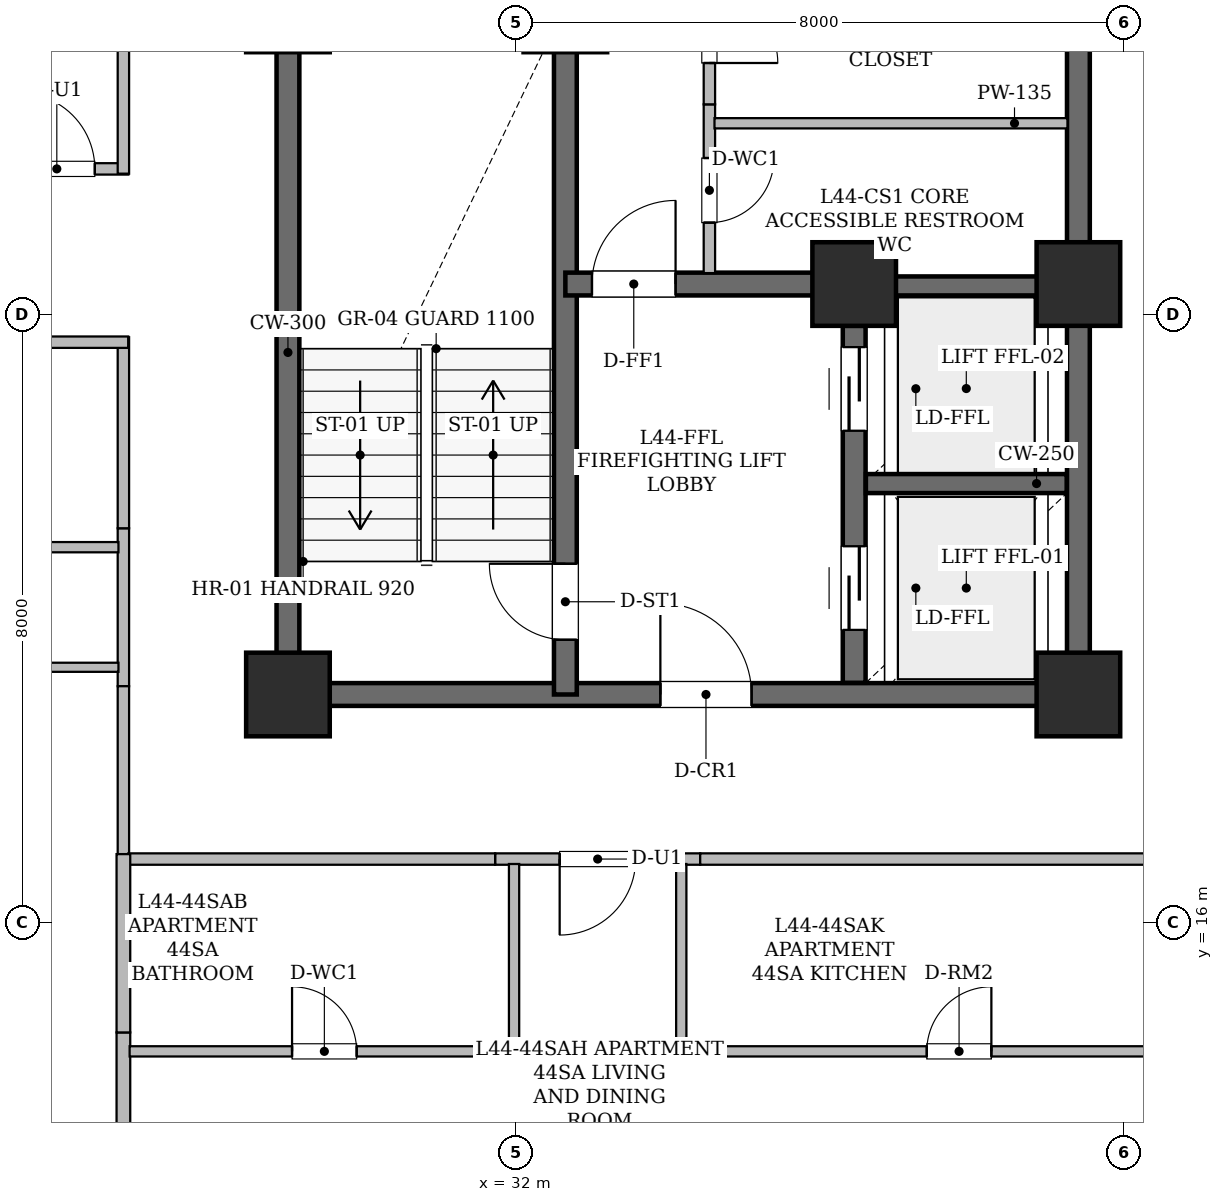
"""IFC4 building model, lengths in metres.
Left out: names, types, materials, properties, quantities, classifications, styles, units other than length and angle.
Written with IfcOpenShell. Run it as: python <this file> out.ifc"""

import sys

from ifc_helpers import new_model, si_unit, direction, frame, frame_2d, origin, origin_2d, place, context, subcontext, project, spatial, rectangle, hollow_rectangle, extrude, element, fill, save


model = new_model("IFC4")
c1 = context("Model", 3, precision=1e-05, world=origin(), true_north=direction((0.0, 1.0)))
c2 = subcontext(c1, "Body", "Model", "MODEL_VIEW")
j1 = project(units=[si_unit("LENGTHUNIT", "METRE"), si_unit("PLANEANGLEUNIT", "RADIAN")], contexts=[c1])
p1 = place(None, origin())
s1 = spatial("IfcSite", under=j1, at=p1, CompositionType="ELEMENT")
p2 = place(p1, origin())
s2 = spatial("IfcBuilding", under=s1, at=p2, CompositionType="ELEMENT")
p3 = place(p2, frame((0.0, 0.0, 174.15)))
s3 = spatial("IfcBuildingStorey", under=s2, at=p3, CompositionType="ELEMENT", Elevation=174.15)
for number, where, z_axis, x_axis in (
    (1, (29.0, 19.0, 0.0), (0.0, 0.0, 1.0), (1.0, 0.0, 0.0)),
    (2, (39.4, 19.0, 0.0), (0.0, 0.0, 1.0), (1.0, 0.0, 0.0)),
    (3, (36.45, 24.4, 0.0), (0.0, 0.0, 1.0), (1.0, 0.0, 0.0)),
    (4, (39.4, 24.4, 0.0), (0.0, 0.0, 1.0), (1.0, 0.0, 0.0)),
):
    element("IfcColumn", number, at=place(p3, frame(where, z_axis=z_axis, x_axis=x_axis)), inside=s3, PredefinedType="COLUMN", context=c2, shape_type="SweptSolid", body=[
        extrude(hollow_rectangle(XDim=1.1, YDim=1.1, WallThickness=0.055, at=origin_2d()), origin(), (0.0, 0.0, 1.0), 3.65),
    ])
p4 = place(p3, frame((29.0, 19.0, 0.0), z_axis=(0.0, 0.0, 1.0), x_axis=(0.0, 1.0, 0.0)))
e5 = element("IfcWall", 5, at=p4, inside=s3, PredefinedType="SHEAR", context=c2, shape_type="SweptSolid", body=[
    extrude(rectangle(XDim=9.0, YDim=0.3, at=frame_2d((4.5, 0.0))), origin(), (0.0, 0.0, 1.0), 3.43),
])
p5 = place(p3, frame((29.0, 19.0, 0.0), z_axis=(0.0, 0.0, 1.0), x_axis=(1.0, 0.0, 0.0)))
e6 = element("IfcWall", 6, at=p5, inside=s3, PredefinedType="SHEAR", context=c2, shape_type="SweptSolid", body=[
    extrude(rectangle(XDim=10.4, YDim=0.3, at=frame_2d((5.2, 0.0))), origin(), (0.0, 0.0, 1.0), 3.43),
])
p6 = place(p5, frame((4.9, 0.0, 0.0)))
e7 = element("IfcOpeningElement", 7, at=p6, cuts=e6, PredefinedType="OPENING", context=c2, shape_type="SweptSolid", body=[
    extrude(rectangle(XDim=1.2, YDim=2.15, at=frame_2d((0.6, 1.075))), frame((0.0, 0.16, 0.0), z_axis=(0.0, -1.0, 0.0), x_axis=(1.0, 0.0, 0.0)), (0.0, 0.0, 1.0), 0.32),
])
p7 = place(p3, frame((39.4, 19.0, 0.0), z_axis=(0.0, 0.0, 1.0), x_axis=(0.0, 1.0, 0.0)))
e8 = element("IfcWall", 8, at=p7, inside=s3, PredefinedType="SHEAR", context=c2, shape_type="SweptSolid", body=[
    extrude(rectangle(XDim=5.4, YDim=0.3, at=frame_2d((2.7, 0.0))), origin(), (0.0, 0.0, 1.0), 3.43),
])
p8 = place(p3, frame((39.4, 24.4, 0.0), z_axis=(0.0, 0.0, 1.0), x_axis=(0.0, 1.0, 0.0)))
e9 = element("IfcWall", 9, at=p8, inside=s3, PredefinedType="SHEAR", context=c2, shape_type="SweptSolid", body=[
    extrude(rectangle(XDim=12.6, YDim=0.3, at=frame_2d((6.3, 0.0))), origin(), (0.0, 0.0, 1.0), 3.43),
])
p9 = place(p3, frame((32.65, 19.0, 0.0), z_axis=(0.0, 0.0, 1.0), x_axis=(0.0, 1.0, 0.0)))
e10 = element("IfcWall", 10, at=p9, inside=s3, PredefinedType="SHEAR", context=c2, shape_type="SweptSolid", body=[
    extrude(rectangle(XDim=9.0, YDim=0.3, at=frame_2d((4.5, 0.0))), origin(), (0.0, 0.0, 1.0), 3.43),
])
p10 = place(p9, frame((0.72, 0.0, 0.0)))
e11 = element("IfcOpeningElement", 11, at=p10, cuts=e10, PredefinedType="OPENING", context=c2, shape_type="SweptSolid", body=[
    extrude(rectangle(XDim=1.0, YDim=2.15, at=frame_2d((0.5, 1.075))), frame((0.0, 0.16, 0.0), z_axis=(0.0, -1.0, 0.0), x_axis=(1.0, 0.0, 0.0)), (0.0, 0.0, 1.0), 0.32),
])
p11 = place(p3, frame((32.65, 24.4, 0.0), z_axis=(0.0, 0.0, 1.0), x_axis=(1.0, 0.0, 0.0)))
e12 = element("IfcWall", 12, at=p11, inside=s3, PredefinedType="SHEAR", context=c2, shape_type="SweptSolid", body=[
    extrude(rectangle(XDim=3.8, YDim=0.3, at=frame_2d((1.9, 0.0))), origin(), (0.0, 0.0, 1.0), 3.43),
])
p12 = place(p11, frame((0.35, 0.0, 0.0)))
e13 = element("IfcOpeningElement", 13, at=p12, cuts=e12, PredefinedType="OPENING", context=c2, shape_type="SweptSolid", body=[
    extrude(rectangle(XDim=1.1, YDim=2.15, at=frame_2d((0.55, 1.075))), frame((0.0, 0.16, 0.0), z_axis=(0.0, -1.0, 0.0), x_axis=(1.0, 0.0, 0.0)), (0.0, 0.0, 1.0), 0.32),
])
p13 = place(p3, frame((36.45, 19.154, 0.0), z_axis=(0.0, 0.0, 1.0), x_axis=(0.0, 1.0, 0.0)))
e14 = element("IfcWall", 14, at=p13, inside=s3, PredefinedType="SHEAR", context=c2, shape_type="SweptSolid", body=[
    extrude(rectangle(XDim=4.696, YDim=0.3, at=frame_2d((2.348, 0.0))), origin(), (0.0, 0.0, 1.0), 3.43),
])
p14 = place(p13, frame((0.696, 0.0, 0.0)))
e15 = element("IfcOpeningElement", 15, at=p14, cuts=e14, PredefinedType="OPENING", context=c2, shape_type="SweptSolid", body=[
    extrude(rectangle(XDim=1.1, YDim=2.15, at=frame_2d((0.55, 1.075))), frame((0.0, 0.16, 0.0), z_axis=(0.0, -1.0, 0.0), x_axis=(1.0, 0.0, 0.0)), (0.0, 0.0, 1.0), 0.32),
])
p15 = place(p13, frame((3.316, 0.0, 0.0)))
e16 = element("IfcOpeningElement", 16, at=p15, cuts=e14, PredefinedType="OPENING", context=c2, shape_type="SweptSolid", body=[
    extrude(rectangle(XDim=1.1, YDim=2.15, at=frame_2d((0.55, 1.075))), frame((0.0, 0.16, 0.0), z_axis=(0.0, -1.0, 0.0), x_axis=(1.0, 0.0, 0.0)), (0.0, 0.0, 1.0), 0.32),
])
for number, where, z_axis, x_axis in (
    (17, (36.604, 21.775, 0.0), (0.0, 0.0, 1.0), (1.0, 0.0, 0.0)),
    (18, (36.604, 24.375, 0.0), (0.0, 0.0, 1.0), (1.0, 0.0, 0.0)),
):
    element("IfcWall", number, at=place(p3, frame(where, z_axis=z_axis, x_axis=x_axis)), inside=s3, PredefinedType="SHEAR", context=c2, shape_type="SweptSolid", body=[
        extrude(rectangle(XDim=2.642, YDim=0.25, at=frame_2d((1.321, 0.0))), origin(), (0.0, 0.0, 1.0), 3.43),
    ])
p16 = place(p3, frame((34.545, 26.764, 0.0), z_axis=(0.0, 0.0, 1.0), x_axis=(0.0, -1.0, 0.0)))
e19 = element("IfcWall", 19, at=p16, inside=s3, PredefinedType="STANDARD", context=c2, shape_type="SweptSolid", body=[
    extrude(rectangle(XDim=2.22, YDim=0.15, at=frame_2d((1.11, 0.0))), origin(), (0.0, 0.0, 1.0), 3.43),
])
p17 = place(p16, frame((0.706, 0.0, 0.0)))
e20 = element("IfcOpeningElement", 20, at=p17, cuts=e19, PredefinedType="OPENING", context=c2, shape_type="SweptSolid", body=[
    extrude(rectangle(XDim=0.85, YDim=2.1, at=frame_2d((0.425, 1.05))), frame((0.0, 0.085, 0.0), z_axis=(0.0, -1.0, 0.0), x_axis=(1.0, 0.0, 0.0)), (0.0, 0.0, 1.0), 0.17),
])
p18 = place(p3, frame((34.545, 28.794, 0.0), z_axis=(0.0, 0.0, 1.0), x_axis=(0.0, -1.0, 0.0)))
e21 = element("IfcWall", 21, at=p18, inside=s3, PredefinedType="STANDARD", context=c2, shape_type="SweptSolid", body=[
    extrude(rectangle(XDim=2.03, YDim=0.15, at=frame_2d((1.015, 0.0))), origin(), (0.0, 0.0, 1.0), 3.43),
])
p19 = place(p18, frame((0.586, 0.0, 0.0)))
e22 = element("IfcOpeningElement", 22, at=p19, cuts=e21, PredefinedType="OPENING", context=c2, shape_type="SweptSolid", body=[
    extrude(rectangle(XDim=0.9, YDim=2.1, at=frame_2d((0.45, 1.05))), frame((0.0, 0.085, 0.0), z_axis=(0.0, -1.0, 0.0), x_axis=(1.0, 0.0, 0.0)), (0.0, 0.0, 1.0), 0.17),
])
p20 = place(p3, frame((34.612, 26.515, 0.0), z_axis=(0.0, 0.0, 1.0), x_axis=(1.0, 0.0, 0.0)))
e23 = element("IfcWall", 23, at=p20, inside=s3, PredefinedType="PARTITIONING", context=c2, shape_type="SweptSolid", body=[
    extrude(rectangle(XDim=4.644, YDim=0.135, at=frame_2d((2.322, 0.0))), origin(), (0.0, 0.0, 1.0), 3.43),
])
p21 = place(p3, frame((26.835, 19.109, 0.0), z_axis=(0.0, 0.0, 1.0), x_axis=(0.0, 1.0, 0.0)))
e24 = element("IfcWall", 24, at=p21, inside=s3, PredefinedType="STANDARD", context=c2, shape_type="SweptSolid", body=[
    extrude(rectangle(XDim=2.078, YDim=0.15, at=frame_2d((1.039, 0.0))), origin(), (0.0, 0.0, 1.0), 2.725),
])
p22 = place(p3, frame((26.835, 21.187, 0.0), z_axis=(0.0, 0.0, 1.0), x_axis=(0.0, 1.0, 0.0)))
e25 = element("IfcWall", 25, at=p22, inside=s3, PredefinedType="STANDARD", context=c2, shape_type="SweptSolid", body=[
    extrude(rectangle(XDim=2.513, YDim=0.15, at=frame_2d((1.256, 0.0))), origin(), (0.0, 0.0, 1.0), 3.43),
])
p23 = place(p3, frame((26.898, 23.635, 0.0), z_axis=(0.0, 0.0, 1.0), x_axis=(-1.0, 0.0, 0.0)))
e26 = element("IfcWall", 26, at=p23, inside=s3, PredefinedType="STANDARD", context=c2, shape_type="SweptSolid", body=[
    extrude(rectangle(XDim=4.709, YDim=0.15, at=frame_2d((2.354, 0.0))), origin(), (0.0, 0.0, 1.0), 3.43),
])
p24 = place(p3, frame((26.835, 16.9, 0.0), z_axis=(0.0, 0.0, 1.0), x_axis=(0.0, 1.0, 0.0)))
e27 = element("IfcWall", 27, at=p24, inside=s3, PredefinedType="STANDARD", context=c2, shape_type="SweptSolid", body=[
    extrude(rectangle(XDim=2.209, YDim=0.15, at=frame_2d((1.104, 0.0))), origin(), (0.0, 0.0, 1.0), 2.725),
])
p25 = place(p3, frame((24.976, 25.915, 0.0), z_axis=(0.0, 0.0, 1.0), x_axis=(1.0, 0.0, 0.0)))
e28 = element("IfcWall", 28, at=p25, inside=s3, PredefinedType="STANDARD", context=c2, shape_type="SweptSolid", body=[
    extrude(rectangle(XDim=1.924, YDim=0.15, at=frame_2d((0.962, 0.0))), origin(), (0.0, 0.0, 1.0), 3.43),
])
p26 = place(p25, frame((0.483, 0.0, 0.0)))
e29 = element("IfcOpeningElement", 29, at=p26, cuts=e28, PredefinedType="OPENING", context=c2, shape_type="SweptSolid", body=[
    extrude(rectangle(XDim=1.0, YDim=2.15, at=frame_2d((0.5, 1.075))), frame((0.0, 0.085, 0.0), z_axis=(0.0, -1.0, 0.0), x_axis=(1.0, 0.0, 0.0)), (0.0, 0.0, 1.0), 0.17),
])
p27 = place(p3, frame((26.835, 25.852, 0.0), z_axis=(0.0, 0.0, 1.0), x_axis=(0.0, 1.0, 0.0)))
e30 = element("IfcWall", 30, at=p27, inside=s3, PredefinedType="STANDARD", context=c2, shape_type="SweptSolid", body=[
    extrude(rectangle(XDim=8.648, YDim=0.15, at=frame_2d((4.324, 0.0))), origin(), (0.0, 0.0, 1.0), 2.961),
])
p28 = place(p3, frame((34.424, 16.835, 0.0), z_axis=(0.0, 0.0, 1.0), x_axis=(-1.0, 0.0, 0.0)))
e31 = element("IfcWall", 31, at=p28, inside=s3, PredefinedType="STANDARD", context=c2, shape_type="SweptSolid", body=[
    extrude(rectangle(XDim=2.698, YDim=0.15, at=frame_2d((1.349, 0.0))), origin(), (0.0, 0.0, 1.0), 3.43),
])
p29 = place(p28, frame((0.849, 0.0, 0.0)))
e32 = element("IfcOpeningElement", 32, at=p29, cuts=e31, PredefinedType="OPENING", context=c2, shape_type="SweptSolid", body=[
    extrude(rectangle(XDim=1.0, YDim=2.15, at=frame_2d((0.5, 1.075))), frame((0.0, 0.085, 0.0), z_axis=(0.0, -1.0, 0.0), x_axis=(1.0, 0.0, 0.0)), (0.0, 0.0, 1.0), 0.17),
])
p30 = place(p3, frame((31.726, 16.835, 0.0), z_axis=(0.0, 0.0, 1.0), x_axis=(-1.0, 0.0, 0.0)))
e33 = element("IfcWall", 33, at=p30, inside=s3, PredefinedType="STANDARD", context=c2, shape_type="SweptSolid", body=[
    extrude(rectangle(XDim=4.826, YDim=0.15, at=frame_2d((2.413, 0.0))), origin(), (0.0, 0.0, 1.0), 2.725),
])
p31 = place(p3, frame((41.55, 16.835, 0.0), z_axis=(0.0, 0.0, 1.0), x_axis=(-1.0, 0.0, 0.0)))
e34 = element("IfcWall", 34, at=p31, inside=s3, PredefinedType="STANDARD", context=c2, shape_type="SweptSolid", body=[
    extrude(rectangle(XDim=7.126, YDim=0.15, at=frame_2d((3.563, 0.0))), origin(), (0.0, 0.0, 1.0), 2.725),
])
p32 = place(p3, frame((21.875, 20.938, 0.0), z_axis=(0.0, 0.0, 1.0), x_axis=(1.0, 0.0, 0.0)))
e35 = element("IfcWall", 35, at=p32, inside=s3, PredefinedType="PARTITIONING", context=c2, shape_type="SweptSolid", body=[
    extrude(rectangle(XDim=4.895, YDim=0.135, at=frame_2d((2.448, 0.0))), origin(), (0.0, 0.0, 1.0), 3.43),
])
p33 = place(p32, frame((2.022, 0.0, 0.0)))
e36 = element("IfcOpeningElement", 36, at=p33, cuts=e35, PredefinedType="OPENING", context=c2, shape_type="SweptSolid", body=[
    extrude(rectangle(XDim=0.85, YDim=2.1, at=frame_2d((0.425, 1.05))), frame((0.0, 0.077, 0.0), z_axis=(0.0, -1.0, 0.0), x_axis=(1.0, 0.0, 0.0)), (0.0, 0.0, 1.0), 0.155),
])
p34 = place(p3, frame((26.77, 19.358, 0.0), z_axis=(0.0, 0.0, 1.0), x_axis=(-1.0, 0.0, 0.0)))
e37 = element("IfcWall", 37, at=p34, inside=s3, PredefinedType="PARTITIONING", context=c2, shape_type="SweptSolid", body=[
    extrude(rectangle(XDim=5.21, YDim=0.12, at=frame_2d((2.605, 0.0))), origin(), (0.0, 0.0, 1.0), 2.725),
])
p35 = place(p3, frame((26.835, 14.554, 0.0), z_axis=(0.0, 0.0, 1.0), x_axis=(0.0, -1.0, 0.0)))
e38 = element("IfcWall", 38, at=p35, inside=s3, PredefinedType="STANDARD", context=c2, shape_type="SweptSolid", body=[
    extrude(rectangle(XDim=2.078, YDim=0.18, at=frame_2d((1.039, 0.0))), origin(), (0.0, 0.0, 1.0), 2.961),
])
p36 = place(p3, frame((26.835, 16.9, 0.0), z_axis=(0.0, 0.0, 1.0), x_axis=(0.0, -1.0, 0.0)))
e39 = element("IfcWall", 39, at=p36, inside=s3, PredefinedType="STANDARD", context=c2, shape_type="SweptSolid", body=[
    extrude(rectangle(XDim=2.346, YDim=0.18, at=frame_2d((1.173, 0.0))), origin(), (0.0, 0.0, 1.0), 2.725),
])
p37 = place(p3, frame((26.917, 14.305, 0.0), z_axis=(0.0, 0.0, 1.0), x_axis=(1.0, 0.0, 0.0)))
e40 = element("IfcWall", 40, at=p37, inside=s3, PredefinedType="PARTITIONING", context=c2, shape_type="SweptSolid", body=[
    extrude(rectangle(XDim=5.123, YDim=0.135, at=frame_2d((2.562, 0.0))), origin(), (0.0, 0.0, 1.0), 2.725),
])
p38 = place(p37, frame((2.137, 0.0, 0.0)))
e41 = element("IfcOpeningElement", 41, at=p38, cuts=e40, PredefinedType="OPENING", context=c2, shape_type="SweptSolid", body=[
    extrude(rectangle(XDim=0.85, YDim=2.1, at=frame_2d((0.425, 1.05))), frame((0.0, 0.077, 0.0), z_axis=(0.0, -1.0, 0.0), x_axis=(1.0, 0.0, 0.0)), (0.0, 0.0, 1.0), 0.155),
])
p39 = place(p3, frame((31.975, 14.24, 0.0), z_axis=(0.0, 0.0, 1.0), x_axis=(0.0, 1.0, 0.0)))
e42 = element("IfcWall", 42, at=p39, inside=s3, PredefinedType="PARTITIONING", context=c2, shape_type="SweptSolid", body=[
    extrude(rectangle(XDim=2.53, YDim=0.135, at=frame_2d((1.265, 0.0))), origin(), (0.0, 0.0, 1.0), 2.725),
])
p40 = place(p3, frame((34.175, 16.77, 0.0), z_axis=(0.0, 0.0, 1.0), x_axis=(0.0, -1.0, 0.0)))
e43 = element("IfcWall", 43, at=p40, inside=s3, PredefinedType="PARTITIONING", context=c2, shape_type="SweptSolid", body=[
    extrude(rectangle(XDim=2.53, YDim=0.135, at=frame_2d((1.265, 0.0))), origin(), (0.0, 0.0, 1.0), 3.43),
])
p41 = place(p3, frame((34.11, 14.305, 0.0), z_axis=(0.0, 0.0, 1.0), x_axis=(1.0, 0.0, 0.0)))
e44 = element("IfcWall", 44, at=p41, inside=s3, PredefinedType="PARTITIONING", context=c2, shape_type="SweptSolid", body=[
    extrude(rectangle(XDim=7.44, YDim=0.135, at=frame_2d((3.72, 0.0))), origin(), (0.0, 0.0, 1.0), 3.43),
])
p42 = place(p41, frame((3.295, 0.0, 0.0)))
e45 = element("IfcOpeningElement", 45, at=p42, cuts=e44, PredefinedType="OPENING", context=c2, shape_type="SweptSolid", body=[
    extrude(rectangle(XDim=0.85, YDim=2.1, at=frame_2d((0.425, 1.05))), frame((0.0, 0.077, 0.0), z_axis=(0.0, -1.0, 0.0), x_axis=(1.0, 0.0, 0.0)), (0.0, 0.0, 1.0), 0.155),
])
p43 = place(p10, origin())
e46 = element("IfcDoor", 46, at=p43, inside=s3, OperationType="SINGLE_SWING_RIGHT", PredefinedType="DOOR", context=c2, shape_type="SweptSolid", body=[
    extrude(rectangle(XDim=1.0, YDim=2.15, at=frame_2d((0.5, 1.075))), frame((0.0, 0.025, 0.0), z_axis=(0.0, -1.0, 0.0), x_axis=(1.0, 0.0, 0.0)), (0.0, 0.0, 1.0), 0.05),
])
fill(e11, e46)
p44 = place(p12, origin())
e47 = element("IfcDoor", 47, at=p44, inside=s3, OperationType="SINGLE_SWING_RIGHT", PredefinedType="DOOR", context=c2, shape_type="SweptSolid", body=[
    extrude(rectangle(XDim=1.1, YDim=2.15, at=frame_2d((0.55, 1.075))), frame((0.0, 0.025, 0.0), z_axis=(0.0, -1.0, 0.0), x_axis=(1.0, 0.0, 0.0)), (0.0, 0.0, 1.0), 0.05),
])
fill(e13, e47)
p45 = place(p6, origin())
e48 = element("IfcDoor", 48, at=p45, inside=s3, OperationType="SINGLE_SWING_LEFT", PredefinedType="DOOR", context=c2, shape_type="SweptSolid", body=[
    extrude(rectangle(XDim=1.2, YDim=2.15, at=frame_2d((0.6, 1.075))), frame((0.0, 0.025, 0.0), z_axis=(0.0, -1.0, 0.0), x_axis=(1.0, 0.0, 0.0)), (0.0, 0.0, 1.0), 0.05),
])
fill(e7, e48)
p46 = place(p14, origin())
e49 = element("IfcDoor", 49, at=p46, inside=s3, OperationType="SLIDING_TO_LEFT", PredefinedType="DOOR", context=c2, shape_type="SweptSolid", body=[
    extrude(rectangle(XDim=1.1, YDim=2.15, at=frame_2d((0.55, 1.075))), frame((0.0, 0.025, 0.0), z_axis=(0.0, -1.0, 0.0), x_axis=(1.0, 0.0, 0.0)), (0.0, 0.0, 1.0), 0.05),
])
fill(e15, e49)
p47 = place(p15, origin())
e50 = element("IfcDoor", 50, at=p47, inside=s3, OperationType="SLIDING_TO_LEFT", PredefinedType="DOOR", context=c2, shape_type="SweptSolid", body=[
    extrude(rectangle(XDim=1.1, YDim=2.15, at=frame_2d((0.55, 1.075))), frame((0.0, 0.025, 0.0), z_axis=(0.0, -1.0, 0.0), x_axis=(1.0, 0.0, 0.0)), (0.0, 0.0, 1.0), 0.05),
])
fill(e16, e50)
p48 = place(p17, origin())
e51 = element("IfcDoor", 51, at=p48, inside=s3, OperationType="SINGLE_SWING_LEFT", PredefinedType="DOOR", context=c2, shape_type="SweptSolid", body=[
    extrude(rectangle(XDim=0.85, YDim=2.1, at=frame_2d((0.425, 1.05))), frame((0.0, 0.025, 0.0), z_axis=(0.0, -1.0, 0.0), x_axis=(1.0, 0.0, 0.0)), (0.0, 0.0, 1.0), 0.05),
])
fill(e20, e51)
p49 = place(p19, origin())
e52 = element("IfcDoor", 52, at=p49, inside=s3, OperationType="SINGLE_SWING_RIGHT", PredefinedType="DOOR", context=c2, shape_type="SweptSolid", body=[
    extrude(rectangle(XDim=0.9, YDim=2.1, at=frame_2d((0.45, 1.05))), frame((0.0, 0.025, 0.0), z_axis=(0.0, -1.0, 0.0), x_axis=(1.0, 0.0, 0.0)), (0.0, 0.0, 1.0), 0.05),
])
fill(e22, e52)
p50 = place(p26, origin())
e53 = element("IfcDoor", 53, at=p50, inside=s3, OperationType="SINGLE_SWING_LEFT", PredefinedType="DOOR", context=c2, shape_type="SweptSolid", body=[
    extrude(rectangle(XDim=1.0, YDim=2.15, at=frame_2d((0.5, 1.075))), frame((0.0, 0.025, 0.0), z_axis=(0.0, -1.0, 0.0), x_axis=(1.0, 0.0, 0.0)), (0.0, 0.0, 1.0), 0.05),
])
fill(e29, e53)
p51 = place(p29, origin())
e54 = element("IfcDoor", 54, at=p51, inside=s3, OperationType="SINGLE_SWING_RIGHT", PredefinedType="DOOR", context=c2, shape_type="SweptSolid", body=[
    extrude(rectangle(XDim=1.0, YDim=2.15, at=frame_2d((0.5, 1.075))), frame((0.0, 0.025, 0.0), z_axis=(0.0, -1.0, 0.0), x_axis=(1.0, 0.0, 0.0)), (0.0, 0.0, 1.0), 0.05),
])
fill(e32, e54)
p52 = place(p38, origin())
e55 = element("IfcDoor", 55, at=p52, inside=s3, OperationType="SINGLE_SWING_LEFT", PredefinedType="DOOR", context=c2, shape_type="SweptSolid", body=[
    extrude(rectangle(XDim=0.85, YDim=2.1, at=frame_2d((0.425, 1.05))), frame((0.0, 0.025, 0.0), z_axis=(0.0, -1.0, 0.0), x_axis=(1.0, 0.0, 0.0)), (0.0, 0.0, 1.0), 0.05),
])
fill(e41, e55)
p53 = place(p42, origin())
e56 = element("IfcDoor", 56, at=p53, inside=s3, OperationType="SINGLE_SWING_RIGHT", PredefinedType="DOOR", context=c2, shape_type="SweptSolid", body=[
    extrude(rectangle(XDim=0.85, YDim=2.1, at=frame_2d((0.425, 1.05))), frame((0.0, 0.025, 0.0), z_axis=(0.0, -1.0, 0.0), x_axis=(1.0, 0.0, 0.0)), (0.0, 0.0, 1.0), 0.05),
])
fill(e45, e56)
save(model, sys.argv[1])
